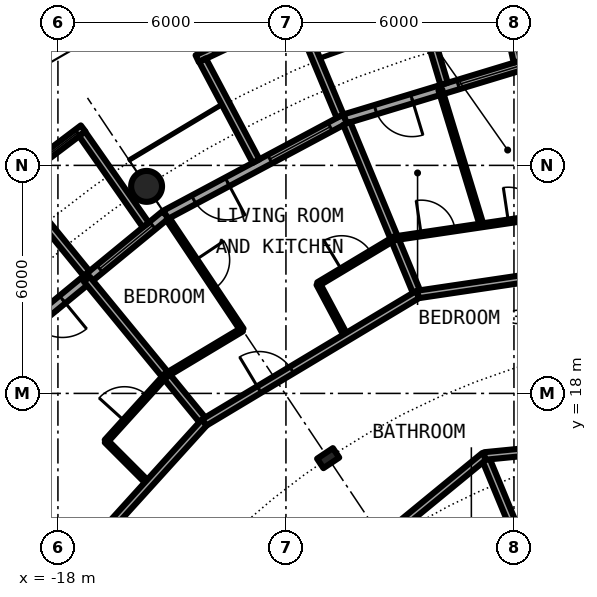
"""IFC4 building model, lengths in metres.
Left out: names, types, materials, properties, quantities, classifications, styles, units other than length and angle.
Written with IfcOpenShell. Run it as: python <this file> out.ifc"""

import sys

from ifc_helpers import new_model, si_unit, direction, frame, frame_2d, origin, origin_2d, place, context, subcontext, project, spatial, rectangle, circle, hollow_circle, i_section, extrude, element, fill, save


model = new_model("IFC4")
c1 = context("Model", 3, precision=1e-05, world=origin(), true_north=direction((0.0, 1.0)))
c2 = subcontext(c1, "Body", "Model", "MODEL_VIEW")
j1 = project(units=[si_unit("LENGTHUNIT", "METRE"), si_unit("PLANEANGLEUNIT", "RADIAN")], contexts=[c1])
p1 = place(None, origin())
s1 = spatial("IfcSite", under=j1, at=p1, CompositionType="ELEMENT")
p2 = place(p1, origin())
s2 = spatial("IfcBuilding", under=s1, at=p2, CompositionType="ELEMENT")
p3 = place(p2, frame((0.0, 0.0, 145.2)))
s3 = spatial("IfcBuildingStorey", under=s2, at=p3, CompositionType="ELEMENT", Elevation=145.2)
p4 = place(p3, frame((-15.667, 23.448, 0.0), z_axis=(0.0, 0.0, 1.0), x_axis=(1.0, 0.0, 0.0)))
e1 = element("IfcColumn", 1, at=p4, inside=s3, PredefinedType="COLUMN", context=c2, shape_type="SweptSolid", body=[
    extrude(hollow_circle(Radius=0.406, WallThickness=0.04, at=origin_2d()), origin(), (0.0, 0.0, 1.0), 3.05),
])
p5 = place(p3, frame((-10.889, 16.297, 0.0), z_axis=(0.0, 0.0, 1.0), x_axis=(-0.55557023302, 0.831469612303, 0.0)))
e2 = element("IfcColumn", 2, at=p5, inside=s3, PredefinedType="COLUMN", context=c2, shape_type="SweptSolid", body=[
    extrude(i_section(OverallWidth=0.3, OverallDepth=0.5, WebThickness=0.014, FlangeThickness=0.028, FilletRadius=0.027, at=origin_2d()), origin(), (0.0, 0.0, 1.0), 3.05),
])
p6 = place(p3, frame((-5.326, 26.775, 0.0), z_axis=(0.0, 0.0, 1.0), x_axis=(-0.956965678721, -0.290201119486, 0.0)))
e3 = element("IfcWall", 3, at=p6, inside=s3, PredefinedType="SOLIDWALL", context=c2, shape_type="SweptSolid", body=[
    extrude(rectangle(XDim=5.351, YDim=0.25, at=frame_2d((2.676, 0.0))), origin(), (0.0, 0.0, 1.0), 2.7),
])
p7 = place(p6, frame((0.441, 0.0, 0.3)))
e4 = element("IfcOpeningElement", 4, at=p7, cuts=e3, PredefinedType="OPENING", context=c2, shape_type="SweptSolid", body=[
    extrude(rectangle(XDim=1.8, YDim=2.1, at=frame_2d((0.9, 1.05))), frame((0.0, 0.135, 0.0), z_axis=(0.0, -1.0, 0.0), x_axis=(1.0, 0.0, 0.0)), (0.0, 0.0, 1.0), 0.27),
])
p8 = place(p6, frame((3.51, 0.0, 0.0)))
e5 = element("IfcOpeningElement", 5, at=p8, cuts=e3, PredefinedType="OPENING", context=c2, shape_type="SweptSolid", body=[
    extrude(rectangle(XDim=1.0, YDim=2.2, at=frame_2d((0.5, 1.1))), frame((0.0, 0.135, 0.0), z_axis=(0.0, -1.0, 0.0), x_axis=(1.0, 0.0, 0.0)), (0.0, 0.0, 1.0), 0.27),
])
p9 = place(p3, frame((-5.909, 26.729, -0.03), z_axis=(0.0, 0.0, 1.0), x_axis=(-0.216409053917, 0.976302781612, 0.0)))
e6 = element("IfcWall", 6, at=p9, inside=s3, PredefinedType="SOLIDWALL", context=c2, shape_type="SweptSolid", body=[
    extrude(rectangle(XDim=2.925, YDim=0.2, at=frame_2d((1.463, 0.0))), origin(), (0.0, 0.0, 1.0), 2.73),
])
p10 = place(p3, frame((-7.837, 26.144, -0.03), z_axis=(0.0, 0.0, 1.0), x_axis=(-0.287064767992, 0.957911174889, 0.0)))
e7 = element("IfcWall", 7, at=p10, inside=s3, PredefinedType="SOLIDWALL", context=c2, shape_type="SweptSolid", body=[
    extrude(rectangle(XDim=3.006, YDim=0.2, at=frame_2d((1.503, 0.0))), origin(), (0.0, 0.0, 1.0), 2.73),
])
p11 = place(p3, frame((-10.447, 25.222, 0.0), z_axis=(0.0, 0.0, 1.0), x_axis=(-0.881915646801, -0.471407246368, 0.0)))
e8 = element("IfcWall", 8, at=p11, inside=s3, PredefinedType="SOLIDWALL", context=c2, shape_type="SweptSolid", body=[
    extrude(rectangle(XDim=5.352, YDim=0.25, at=frame_2d((2.676, 0.0))), origin(), (0.0, 0.0, 1.0), 2.7),
])
p12 = place(p11, frame((0.441, 0.0, 0.3)))
e9 = element("IfcOpeningElement", 9, at=p12, cuts=e8, PredefinedType="OPENING", context=c2, shape_type="SweptSolid", body=[
    extrude(rectangle(XDim=1.8, YDim=2.1, at=frame_2d((0.9, 1.05))), frame((0.0, 0.135, 0.0), z_axis=(0.0, -1.0, 0.0), x_axis=(1.0, 0.0, 0.0)), (0.0, 0.0, 1.0), 0.27),
])
p13 = place(p11, frame((3.51, 0.0, 0.0)))
e10 = element("IfcOpeningElement", 10, at=p13, cuts=e8, PredefinedType="OPENING", context=c2, shape_type="SweptSolid", body=[
    extrude(rectangle(XDim=1.0, YDim=2.2, at=frame_2d((0.5, 1.1))), frame((0.0, 0.135, 0.0), z_axis=(0.0, -1.0, 0.0), x_axis=(1.0, 0.0, 0.0)), (0.0, 0.0, 1.0), 0.27),
])
p14 = place(p3, frame((-11.629, 28.088, -0.03), z_axis=(0.0, 0.0, 1.0), x_axis=(-0.904000060331, -0.427532327342, 0.0)))
e11 = element("IfcWall", 11, at=p14, inside=s3, PredefinedType="SOLIDWALL", context=c2, shape_type="SweptSolid", body=[
    extrude(rectangle(XDim=2.993, YDim=0.2, at=frame_2d((1.497, 0.0))), origin(), (0.0, 0.0, 1.0), 2.73),
])
p15 = place(p14, frame((0.457, 0.0, 0.33)))
e12 = element("IfcOpeningElement", 12, at=p15, cuts=e11, PredefinedType="OPENING", context=c2, shape_type="SweptSolid", body=[
    extrude(circle(Radius=1.04, at=frame_2d((1.04, 1.04))), frame((0.0, 0.11, 0.0), z_axis=(0.0, -1.0, 0.0), x_axis=(1.0, 0.0, 0.0)), (0.0, 0.0, 1.0), 0.22),
])
p16 = place(p3, frame((-10.575, 25.295, -0.03), z_axis=(0.0, 0.0, 1.0), x_axis=(-0.385697364644, 0.922625353492, 0.0)))
e13 = element("IfcWall", 13, at=p16, inside=s3, PredefinedType="SOLIDWALL", context=c2, shape_type="SweptSolid", body=[
    extrude(rectangle(XDim=2.883, YDim=0.2, at=frame_2d((1.442, 0.0))), origin(), (0.0, 0.0, 1.0), 2.73),
])
p17 = place(p3, frame((-12.787, 24.113, -0.03), z_axis=(0.0, 0.0, 1.0), x_axis=(-0.468365282436, 0.883534924159, 0.0)))
e14 = element("IfcWall", 14, at=p17, inside=s3, PredefinedType="SOLIDWALL", context=c2, shape_type="SweptSolid", body=[
    extrude(rectangle(XDim=3.006, YDim=0.2, at=frame_2d((1.503, 0.0))), origin(), (0.0, 0.0, 1.0), 2.73),
])
p18 = place(p3, frame((-15.167, 22.699, 0.0), z_axis=(0.0, 0.0, 1.0), x_axis=(-0.773019449054, -0.634382322723, 0.0)))
e15 = element("IfcWall", 15, at=p18, inside=s3, PredefinedType="SOLIDWALL", context=c2, shape_type="SweptSolid", body=[
    extrude(rectangle(XDim=5.352, YDim=0.25, at=frame_2d((2.676, 0.0))), origin(), (0.0, 0.0, 1.0), 2.7),
])
p19 = place(p18, frame((0.441, 0.0, 0.3)))
e16 = element("IfcOpeningElement", 16, at=p19, cuts=e15, PredefinedType="OPENING", context=c2, shape_type="SweptSolid", body=[
    extrude(rectangle(XDim=1.8, YDim=2.1, at=frame_2d((0.9, 1.05))), frame((0.0, 0.135, 0.0), z_axis=(0.0, -1.0, 0.0), x_axis=(1.0, 0.0, 0.0)), (0.0, 0.0, 1.0), 0.27),
])
p20 = place(p18, frame((3.51, 0.0, 0.0)))
e17 = element("IfcOpeningElement", 17, at=p20, cuts=e15, PredefinedType="OPENING", context=c2, shape_type="SweptSolid", body=[
    extrude(rectangle(XDim=1.0, YDim=2.2, at=frame_2d((0.5, 1.1))), frame((0.0, 0.135, 0.0), z_axis=(0.0, -1.0, 0.0), x_axis=(1.0, 0.0, 0.0)), (0.0, 0.0, 1.0), 0.27),
])
p21 = place(p3, frame((-17.337, 24.972, -0.03), z_axis=(0.0, 0.0, 1.0), x_axis=(-0.797887588059, -0.602806268067, 0.0)))
e18 = element("IfcWall", 18, at=p21, inside=s3, PredefinedType="SOLIDWALL", context=c2, shape_type="SweptSolid", body=[
    extrude(rectangle(XDim=2.447, YDim=0.2, at=frame_2d((1.223, 0.0))), origin(), (0.0, 0.0, 1.0), 2.73),
])
p22 = place(p21, frame((0.183, 0.0, 0.33)))
e19 = element("IfcOpeningElement", 19, at=p22, cuts=e18, PredefinedType="OPENING", context=c2, shape_type="SweptSolid", body=[
    extrude(circle(Radius=1.04, at=frame_2d((1.04, 1.04))), frame((0.0, 0.11, 0.0), z_axis=(0.0, -1.0, 0.0), x_axis=(1.0, 0.0, 0.0)), (0.0, 0.0, 1.0), 0.22),
])
p23 = place(p3, frame((-15.688, 22.433, -0.03), z_axis=(0.0, 0.0, 1.0), x_axis=(-0.573260687834, 0.819373043115, 0.0)))
e20 = element("IfcWall", 20, at=p23, inside=s3, PredefinedType="SOLIDWALL", context=c2, shape_type="SweptSolid", body=[
    extrude(rectangle(XDim=2.925, YDim=0.2, at=frame_2d((1.463, 0.0))), origin(), (0.0, 0.0, 1.0), 2.73),
])
p24 = place(p3, frame((-17.246, 21.155, -0.03), z_axis=(0.0, 0.0, 1.0), x_axis=(-0.631741648902, 0.775179004516, 0.0)))
e21 = element("IfcWall", 21, at=p24, inside=s3, PredefinedType="SOLIDWALL", context=c2, shape_type="SweptSolid", body=[
    extrude(rectangle(XDim=3.006, YDim=0.2, at=frame_2d((1.503, 0.0))), origin(), (0.0, 0.0, 1.0), 2.73),
])
p25 = place(p3, frame((-11.151, 20.879, 0.0), z_axis=(0.0, 0.0, 1.0), x_axis=(0.470724185475, -0.88228042096, 0.0)))
e22 = element("IfcWall", 22, at=p25, inside=s3, PredefinedType="PARTITIONING", context=c2, shape_type="SweptSolid", body=[
    extrude(rectangle(XDim=1.584, YDim=0.1, at=frame_2d((0.792, 0.0))), origin(), (0.0, 0.0, 1.0), 2.7),
])
p26 = place(p3, frame((-17.24, 21.007, 0.0), z_axis=(0.0, 0.0, 1.0), x_axis=(0.634374159378, -0.773026148273, 0.0)))
e23 = element("IfcWall", 23, at=p26, inside=s3, PredefinedType="PARTITIONING", context=c2, shape_type="SweptSolid", body=[
    extrude(rectangle(XDim=4.876, YDim=0.2, at=frame_2d((2.438, 0.0))), origin(), (0.0, 0.0, 1.0), 2.7),
])
p27 = place(p3, frame((-16.732, 16.743, 0.0), z_axis=(0.0, 0.0, 1.0), x_axis=(0.70679853939, -0.707414888673, 0.0)))
e24 = element("IfcWall", 24, at=p27, inside=s3, PredefinedType="PARTITIONING", context=c2, shape_type="SweptSolid", body=[
    extrude(rectangle(XDim=1.584, YDim=0.1, at=frame_2d((0.792, 0.0))), origin(), (0.0, 0.0, 1.0), 2.7),
])
p28 = place(p3, frame((-15.105, 22.59, 0.0), z_axis=(0.0, 0.0, 1.0), x_axis=(0.555873265997, -0.831267052246, 0.0)))
e25 = element("IfcWall", 25, at=p28, inside=s3, PredefinedType="PARTITIONING", context=c2, shape_type="SweptSolid", body=[
    extrude(rectangle(XDim=3.504, YDim=0.1, at=frame_2d((1.752, 0.0))), origin(), (0.0, 0.0, 1.0), 2.7),
])
p29 = place(p28, frame((1.302, 0.0, 0.0)))
e26 = element("IfcOpeningElement", 26, at=p29, cuts=e25, PredefinedType="OPENING", context=c2, shape_type="SweptSolid", body=[
    extrude(rectangle(XDim=0.9, YDim=2.3, at=frame_2d((0.45, 1.15))), frame((0.0, 0.06, 0.0), z_axis=(0.0, -1.0, 0.0), x_axis=(1.0, 0.0, 0.0)), (0.0, 0.0, 1.0), 0.12),
])
p30 = place(p3, frame((-10.4, 25.105, 0.0), z_axis=(0.0, 0.0, 1.0), x_axis=(0.382722001241, -0.923863555817, 0.0)))
e27 = element("IfcWall", 27, at=p30, inside=s3, PredefinedType="PARTITIONING", context=c2, shape_type="SweptSolid", body=[
    extrude(rectangle(XDim=4.873, YDim=0.2, at=frame_2d((2.437, 0.0))), origin(), (0.0, 0.0, 1.0), 2.7),
])
p31 = place(p3, frame((-7.938, 25.99, 0.0), z_axis=(0.0, 0.0, 1.0), x_axis=(0.292195259296, -0.956358682945, 0.0)))
e28 = element("IfcWall", 28, at=p31, inside=s3, PredefinedType="PARTITIONING", context=c2, shape_type="SweptSolid", body=[
    extrude(rectangle(XDim=3.731, YDim=0.1, at=frame_2d((1.865, 0.0))), origin(), (0.0, 0.0, 1.0), 2.7),
])
p32 = place(p3, frame((-6.775, 16.352, 0.0), z_axis=(0.0, 0.0, 1.0), x_axis=(0.382750767534, -0.923851638496, 0.0)))
e29 = element("IfcWall", 29, at=p32, inside=s3, PredefinedType="PARTITIONING", context=c2, shape_type="SweptSolid", body=[
    extrude(rectangle(XDim=9.98, YDim=0.2, at=frame_2d((4.99, 0.0))), origin(), (0.0, 0.0, 1.0), 2.7),
])
p33 = place(p3, frame((-14.717, 9.834, 0.0), z_axis=(0.0, 0.0, 1.0), x_axis=(0.773034536097, 0.634363938131, 0.0)))
e30 = element("IfcWall", 30, at=p33, inside=s3, PredefinedType="PARTITIONING", context=c2, shape_type="SweptSolid", body=[
    extrude(rectangle(XDim=10.277, YDim=0.2, at=frame_2d((5.138, 0.0))), origin(), (0.0, 0.0, 1.0), 2.7),
])
p34 = place(p33, frame((4.638, 0.0, 0.0)))
e31 = element("IfcOpeningElement", 31, at=p34, cuts=e30, PredefinedType="OPENING", context=c2, shape_type="SweptSolid", body=[
    extrude(rectangle(XDim=1.0, YDim=2.3, at=frame_2d((0.5, 1.15))), frame((0.0, 0.11, 0.0), z_axis=(0.0, -1.0, 0.0), x_axis=(1.0, 0.0, 0.0)), (0.0, 0.0, 1.0), 0.22),
])
p35 = place(p3, frame((-6.773, 16.353, 0.0), z_axis=(0.0, 0.0, 1.0), x_axis=(0.995201809366, 0.097843541607, 0.0)))
e32 = element("IfcWall", 32, at=p35, inside=s3, PredefinedType="PARTITIONING", context=c2, shape_type="SweptSolid", body=[
    extrude(rectangle(XDim=10.28, YDim=0.2, at=frame_2d((5.14, 0.0))), origin(), (0.0, 0.0, 1.0), 2.7),
])
p36 = place(p35, frame((4.638, 0.0, 0.0)))
e33 = element("IfcOpeningElement", 33, at=p36, cuts=e32, PredefinedType="OPENING", context=c2, shape_type="SweptSolid", body=[
    extrude(rectangle(XDim=1.0, YDim=2.3, at=frame_2d((0.5, 1.15))), frame((0.0, 0.11, 0.0), z_axis=(0.0, -1.0, 0.0), x_axis=(1.0, 0.0, 0.0)), (0.0, 0.0, 1.0), 0.22),
])
p37 = place(p3, frame((-8.534, 20.603, 0.0), z_axis=(0.0, 0.0, 1.0), x_axis=(0.989177441421, 0.146724194948, 0.0)))
e34 = element("IfcWall", 34, at=p37, inside=s3, PredefinedType="PARTITIONING", context=c2, shape_type="SweptSolid", body=[
    extrude(rectangle(XDim=10.837, YDim=0.2, at=frame_2d((5.418, 0.0))), origin(), (0.0, 0.0, 1.0), 2.7),
])
p38 = place(p37, frame((3.835, 0.0, 0.0)))
e35 = element("IfcOpeningElement", 35, at=p38, cuts=e34, PredefinedType="OPENING", context=c2, shape_type="SweptSolid", body=[
    extrude(rectangle(XDim=1.0, YDim=2.3, at=frame_2d((0.5, 1.15))), frame((0.0, 0.11, 0.0), z_axis=(0.0, -1.0, 0.0), x_axis=(1.0, 0.0, 0.0)), (0.0, 0.0, 1.0), 0.22),
])
p39 = place(p3, frame((-18.542, 12.389, 0.0), z_axis=(0.0, 0.0, 1.0), x_axis=(0.671561669125, 0.740948665268, 0.0)))
e36 = element("IfcWall", 36, at=p39, inside=s3, PredefinedType="PARTITIONING", context=c2, shape_type="SweptSolid", body=[
    extrude(rectangle(XDim=6.544, YDim=0.2, at=frame_2d((3.272, 0.0))), origin(), (0.0, 0.0, 1.0), 2.7),
])
p40 = place(p39, frame((1.682, 0.0, 0.0)))
e37 = element("IfcOpeningElement", 37, at=p40, cuts=e36, PredefinedType="OPENING", context=c2, shape_type="SweptSolid", body=[
    extrude(rectangle(XDim=1.0, YDim=2.3, at=frame_2d((0.5, 1.15))), frame((0.0, 0.11, 0.0), z_axis=(0.0, -1.0, 0.0), x_axis=(1.0, 0.0, 0.0)), (0.0, 0.0, 1.0), 0.22),
])
p41 = place(p3, frame((-14.15, 17.235, 0.0), z_axis=(0.0, 0.0, 1.0), x_axis=(0.857604752351, 0.514309331769, 0.0)))
e38 = element("IfcWall", 38, at=p41, inside=s3, PredefinedType="PARTITIONING", context=c2, shape_type="SweptSolid", body=[
    extrude(rectangle(XDim=6.548, YDim=0.2, at=frame_2d((3.274, 0.0))), origin(), (0.0, 0.0, 1.0), 2.7),
])
p42 = place(p41, frame((1.685, 0.0, 0.0)))
e39 = element("IfcOpeningElement", 39, at=p42, cuts=e38, PredefinedType="OPENING", context=c2, shape_type="SweptSolid", body=[
    extrude(rectangle(XDim=1.0, YDim=2.3, at=frame_2d((0.5, 1.15))), frame((0.0, 0.11, 0.0), z_axis=(0.0, -1.0, 0.0), x_axis=(1.0, 0.0, 0.0)), (0.0, 0.0, 1.0), 0.22),
])
p43 = place(p3, frame((-9.149, 22.08, 0.0), z_axis=(0.0, 0.0, 1.0), x_axis=(0.989175993049, 0.146733959176, 0.0)))
e40 = element("IfcWall", 40, at=p43, inside=s3, PredefinedType="PARTITIONING", context=c2, shape_type="SweptSolid", body=[
    extrude(rectangle(XDim=6.971, YDim=0.1, at=frame_2d((3.486, 0.0))), origin(), (0.0, 0.0, 1.0), 2.7),
])
p44 = place(p43, frame((3.034, 0.0, 0.0)))
e41 = element("IfcOpeningElement", 41, at=p44, cuts=e40, PredefinedType="OPENING", context=c2, shape_type="SweptSolid", body=[
    extrude(rectangle(XDim=0.9, YDim=2.3, at=frame_2d((0.45, 1.15))), frame((0.0, 0.06, 0.0), z_axis=(0.0, -1.0, 0.0), x_axis=(1.0, 0.0, 0.0)), (0.0, 0.0, 1.0), 0.12),
])
p45 = place(p43, frame((0.716, 0.0, 0.0)))
e42 = element("IfcOpeningElement", 42, at=p45, cuts=e40, PredefinedType="OPENING", context=c2, shape_type="SweptSolid", body=[
    extrude(rectangle(XDim=0.9, YDim=2.3, at=frame_2d((0.45, 1.15))), frame((0.0, 0.06, 0.0), z_axis=(0.0, -1.0, 0.0), x_axis=(1.0, 0.0, 0.0)), (0.0, 0.0, 1.0), 0.12),
])
p46 = place(p3, frame((-16.732, 16.743, 0.0), z_axis=(0.0, 0.0, 1.0), x_axis=(0.671528384412, 0.740978831634, 0.0)))
e43 = element("IfcWall", 43, at=p46, inside=s3, PredefinedType="PARTITIONING", context=c2, shape_type="SweptSolid", body=[
    extrude(rectangle(XDim=2.338, YDim=0.1, at=frame_2d((1.169, 0.0))), origin(), (0.0, 0.0, 1.0), 2.7),
])
p47 = place(p46, frame((0.719, 0.0, 0.0)))
e44 = element("IfcOpeningElement", 44, at=p47, cuts=e43, PredefinedType="OPENING", context=c2, shape_type="SweptSolid", body=[
    extrude(rectangle(XDim=0.9, YDim=2.3, at=frame_2d((0.45, 1.15))), frame((0.0, 0.06, 0.0), z_axis=(0.0, -1.0, 0.0), x_axis=(1.0, 0.0, 0.0)), (0.0, 0.0, 1.0), 0.12),
])
p48 = place(p3, frame((-15.162, 18.475, 0.0), z_axis=(0.0, 0.0, 1.0), x_axis=(0.857714000218, 0.514127118358, 0.0)))
e45 = element("IfcWall", 45, at=p48, inside=s3, PredefinedType="PARTITIONING", context=c2, shape_type="SweptSolid", body=[
    extrude(rectangle(XDim=2.338, YDim=0.1, at=frame_2d((1.169, 0.0))), origin(), (0.0, 0.0, 1.0), 2.7),
])
p49 = place(p3, frame((-11.151, 20.879, 0.0), z_axis=(0.0, 0.0, 1.0), x_axis=(0.857640331606, 0.514249999127, 0.0)))
e46 = element("IfcWall", 46, at=p49, inside=s3, PredefinedType="PARTITIONING", context=c2, shape_type="SweptSolid", body=[
    extrude(rectangle(XDim=2.338, YDim=0.1, at=frame_2d((1.169, 0.0))), origin(), (0.0, 0.0, 1.0), 2.7),
])
p50 = place(p49, frame((0.719, 0.0, 0.0)))
e47 = element("IfcOpeningElement", 47, at=p50, cuts=e46, PredefinedType="OPENING", context=c2, shape_type="SweptSolid", body=[
    extrude(rectangle(XDim=0.9, YDim=2.3, at=frame_2d((0.45, 1.15))), frame((0.0, 0.06, 0.0), z_axis=(0.0, -1.0, 0.0), x_axis=(1.0, 0.0, 0.0)), (0.0, 0.0, 1.0), 0.12),
])
p51 = place(p7, origin())
e48 = element("IfcWindow", 48, at=p51, inside=s3, PartitioningType="SINGLE_PANEL", PredefinedType="WINDOW", context=c2, shape_type="SweptSolid", body=[
    extrude(rectangle(XDim=1.8, YDim=2.1, at=frame_2d((0.9, 1.05))), frame((0.0, 0.03, 0.0), z_axis=(0.0, -1.0, 0.0), x_axis=(1.0, 0.0, 0.0)), (0.0, 0.0, 1.0), 0.06),
])
fill(e4, e48)
p52 = place(p8, origin())
e49 = element("IfcDoor", 49, at=p52, inside=s3, OperationType="SINGLE_SWING_LEFT", PredefinedType="DOOR", context=c2, shape_type="SweptSolid", body=[
    extrude(rectangle(XDim=1.0, YDim=2.2, at=frame_2d((0.5, 1.1))), frame((0.0, 0.025, 0.0), z_axis=(0.0, -1.0, 0.0), x_axis=(1.0, 0.0, 0.0)), (0.0, 0.0, 1.0), 0.05),
])
fill(e5, e49)
p53 = place(p12, origin())
e50 = element("IfcWindow", 50, at=p53, inside=s3, PartitioningType="SINGLE_PANEL", PredefinedType="WINDOW", context=c2, shape_type="SweptSolid", body=[
    extrude(rectangle(XDim=1.8, YDim=2.1, at=frame_2d((0.9, 1.05))), frame((0.0, 0.03, 0.0), z_axis=(0.0, -1.0, 0.0), x_axis=(1.0, 0.0, 0.0)), (0.0, 0.0, 1.0), 0.06),
])
fill(e9, e50)
p54 = place(p13, origin())
e51 = element("IfcDoor", 51, at=p54, inside=s3, OperationType="SINGLE_SWING_LEFT", PredefinedType="DOOR", context=c2, shape_type="SweptSolid", body=[
    extrude(rectangle(XDim=1.0, YDim=2.2, at=frame_2d((0.5, 1.1))), frame((0.0, 0.025, 0.0), z_axis=(0.0, -1.0, 0.0), x_axis=(1.0, 0.0, 0.0)), (0.0, 0.0, 1.0), 0.05),
])
fill(e10, e51)
p55 = place(p19, origin())
e52 = element("IfcWindow", 52, at=p55, inside=s3, PartitioningType="SINGLE_PANEL", PredefinedType="WINDOW", context=c2, shape_type="SweptSolid", body=[
    extrude(rectangle(XDim=1.8, YDim=2.1, at=frame_2d((0.9, 1.05))), frame((0.0, 0.03, 0.0), z_axis=(0.0, -1.0, 0.0), x_axis=(1.0, 0.0, 0.0)), (0.0, 0.0, 1.0), 0.06),
])
fill(e16, e52)
p56 = place(p22, origin())
e53 = element("IfcWindow", 53, at=p56, inside=s3, PartitioningType="SINGLE_PANEL", PredefinedType="WINDOW", context=c2, shape_type="SweptSolid", body=[
    extrude(circle(Radius=1.04, at=frame_2d((1.04, 1.04))), frame((0.0, 0.03, 0.0), z_axis=(0.0, -1.0, 0.0), x_axis=(1.0, 0.0, 0.0)), (0.0, 0.0, 1.0), 0.06),
])
fill(e19, e53)
p57 = place(p20, origin())
e54 = element("IfcDoor", 54, at=p57, inside=s3, OperationType="SINGLE_SWING_LEFT", PredefinedType="DOOR", context=c2, shape_type="SweptSolid", body=[
    extrude(rectangle(XDim=1.0, YDim=2.2, at=frame_2d((0.5, 1.1))), frame((0.0, 0.025, 0.0), z_axis=(0.0, -1.0, 0.0), x_axis=(1.0, 0.0, 0.0)), (0.0, 0.0, 1.0), 0.05),
])
fill(e17, e54)
p58 = place(p44, origin())
e55 = element("IfcDoor", 55, at=p58, inside=s3, OperationType="SINGLE_SWING_LEFT", PredefinedType="DOOR", context=c2, shape_type="SweptSolid", body=[
    extrude(rectangle(XDim=0.9, YDim=2.3, at=frame_2d((0.45, 1.15))), frame((0.0, 0.025, 0.0), z_axis=(0.0, -1.0, 0.0), x_axis=(1.0, 0.0, 0.0)), (0.0, 0.0, 1.0), 0.05),
])
fill(e41, e55)
p59 = place(p45, origin())
e56 = element("IfcDoor", 56, at=p59, inside=s3, OperationType="SINGLE_SWING_LEFT", PredefinedType="DOOR", context=c2, shape_type="SweptSolid", body=[
    extrude(rectangle(XDim=0.9, YDim=2.3, at=frame_2d((0.45, 1.15))), frame((0.0, 0.025, 0.0), z_axis=(0.0, -1.0, 0.0), x_axis=(1.0, 0.0, 0.0)), (0.0, 0.0, 1.0), 0.05),
])
fill(e42, e56)
p60 = place(p42, origin())
e57 = element("IfcDoor", 57, at=p60, inside=s3, OperationType="SINGLE_SWING_LEFT", PredefinedType="DOOR", context=c2, shape_type="SweptSolid", body=[
    extrude(rectangle(XDim=1.0, YDim=2.3, at=frame_2d((0.5, 1.15))), frame((0.0, 0.025, 0.0), z_axis=(0.0, -1.0, 0.0), x_axis=(1.0, 0.0, 0.0)), (0.0, 0.0, 1.0), 0.05),
])
fill(e39, e57)
p61 = place(p50, origin())
e58 = element("IfcDoor", 58, at=p61, inside=s3, OperationType="SINGLE_SWING_RIGHT", PredefinedType="DOOR", context=c2, shape_type="SweptSolid", body=[
    extrude(rectangle(XDim=0.9, YDim=2.3, at=frame_2d((0.45, 1.15))), frame((0.0, 0.025, 0.0), z_axis=(0.0, -1.0, 0.0), x_axis=(1.0, 0.0, 0.0)), (0.0, 0.0, 1.0), 0.05),
])
fill(e47, e58)
p62 = place(p29, origin())
e59 = element("IfcDoor", 59, at=p62, inside=s3, OperationType="SINGLE_SWING_RIGHT", PredefinedType="DOOR", context=c2, shape_type="SweptSolid", body=[
    extrude(rectangle(XDim=0.9, YDim=2.3, at=frame_2d((0.45, 1.15))), frame((0.0, 0.025, 0.0), z_axis=(0.0, -1.0, 0.0), x_axis=(1.0, 0.0, 0.0)), (0.0, 0.0, 1.0), 0.05),
])
fill(e26, e59)
p63 = place(p47, origin())
e60 = element("IfcDoor", 60, at=p63, inside=s3, OperationType="SINGLE_SWING_LEFT", PredefinedType="DOOR", context=c2, shape_type="SweptSolid", body=[
    extrude(rectangle(XDim=0.9, YDim=2.3, at=frame_2d((0.45, 1.15))), frame((0.0, 0.025, 0.0), z_axis=(0.0, -1.0, 0.0), x_axis=(1.0, 0.0, 0.0)), (0.0, 0.0, 1.0), 0.05),
])
fill(e44, e60)
save(model, sys.argv[1])
